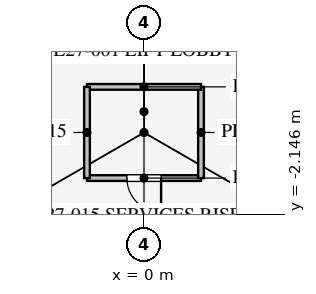
"""IFC4 building model, lengths in metres.
Left out: names, types, materials, properties, quantities, classifications, styles, units other than length and angle.
Written with IfcOpenShell. Run it as: python <this file> out.ifc"""

import sys

from ifc_helpers import new_model, si_unit, direction, frame, frame_2d, origin, place, context, subcontext, project, spatial, rectangle, extrude, element, fill, save


model = new_model("IFC4")
c1 = context("Model", 3, precision=1e-05, world=origin(), true_north=direction((0.0, 1.0)))
c2 = subcontext(c1, "Body", "Model", "MODEL_VIEW")
j1 = project(units=[si_unit("LENGTHUNIT", "METRE"), si_unit("PLANEANGLEUNIT", "RADIAN")], contexts=[c1])
p1 = place(None, origin())
s1 = spatial("IfcSite", under=j1, at=p1, CompositionType="ELEMENT")
p2 = place(p1, origin())
s2 = spatial("IfcBuilding", under=s1, at=p2, CompositionType="ELEMENT")
p3 = place(p2, frame((0.0, 0.0, 119.9)))
s3 = spatial("IfcBuildingStorey", under=s2, at=p3, CompositionType="ELEMENT", Elevation=119.9)
p4 = place(p3, frame((-1.5, -1.2, 0.0), z_axis=(0.0, 0.0, 1.0), x_axis=(1.0, 0.0, 0.0)))
e1 = element("IfcWall", 1, at=p4, inside=s3, PredefinedType="PARTITIONING", context=c2, shape_type="SweptSolid", body=[
    extrude(rectangle(XDim=3.0, YDim=0.15, at=frame_2d((1.5, 0.0))), origin(), (0.0, 0.0, 1.0), 4.0),
])
p5 = place(p4, frame((1.05, 0.0, 0.0)))
e2 = element("IfcOpeningElement", 2, at=p5, cuts=e1, PredefinedType="OPENING", context=c2, shape_type="SweptSolid", body=[
    extrude(rectangle(XDim=0.9, YDim=2.1, at=frame_2d((0.45, 1.05))), frame((0.0, 0.085, 0.0), z_axis=(0.0, -1.0, 0.0), x_axis=(1.0, 0.0, 0.0)), (0.0, 0.0, 1.0), 0.17),
])
p6 = place(p3, frame((1.5, -1.2, 0.0), z_axis=(0.0, 0.0, 1.0), x_axis=(0.0, 1.0, 0.0)))
e3 = element("IfcWall", 3, at=p6, inside=s3, PredefinedType="PARTITIONING", context=c2, shape_type="SweptSolid", body=[
    extrude(rectangle(XDim=2.4, YDim=0.15, at=frame_2d((1.2, 0.0))), origin(), (0.0, 0.0, 1.0), 4.0),
])
p7 = place(p3, frame((1.5, 1.2, 0.0), z_axis=(0.0, 0.0, 1.0), x_axis=(-1.0, 0.0, 0.0)))
e4 = element("IfcWall", 4, at=p7, inside=s3, PredefinedType="PARTITIONING", context=c2, shape_type="SweptSolid", body=[
    extrude(rectangle(XDim=3.0, YDim=0.15, at=frame_2d((1.5, 0.0))), origin(), (0.0, 0.0, 1.0), 4.0),
])
p8 = place(p3, frame((-1.5, 1.2, 0.0), z_axis=(0.0, 0.0, 1.0), x_axis=(0.0, -1.0, 0.0)))
e5 = element("IfcWall", 5, at=p8, inside=s3, PredefinedType="PARTITIONING", context=c2, shape_type="SweptSolid", body=[
    extrude(rectangle(XDim=2.4, YDim=0.15, at=frame_2d((1.2, 0.0))), origin(), (0.0, 0.0, 1.0), 4.0),
])
p9 = place(p3, frame((26.415, -15.231, 0.0), z_axis=(0.0, 0.0, 1.0), x_axis=(-0.50000091641, 0.866024874695, 0.0)))
e6 = element("IfcWall", 6, at=p9, inside=s3, PredefinedType="PARTITIONING", context=c2, shape_type="SweptSolid", body=[
    extrude(rectangle(XDim=52.796, YDim=0.12, at=frame_2d((26.398, 0.0))), origin(), (0.0, 0.0, 1.0), 2.9),
])
p10 = place(p9, frame((10.2, 0.0, 0.15)))
e7 = element("IfcOpeningElement", 7, at=p10, cuts=e6, PredefinedType="OPENING", context=c2, shape_type="SweptSolid", body=[
    extrude(rectangle(XDim=1.8, YDim=2.1, at=frame_2d((0.9, 1.05))), frame((0.0, 0.07, 0.0), z_axis=(0.0, -1.0, 0.0), x_axis=(1.0, 0.0, 0.0)), (0.0, 0.0, 1.0), 0.14),
])
p11 = place(p9, frame((40.8, 0.0, 0.15)))
e8 = element("IfcOpeningElement", 8, at=p11, cuts=e6, PredefinedType="OPENING", context=c2, shape_type="SweptSolid", body=[
    extrude(rectangle(XDim=1.8, YDim=2.1, at=frame_2d((0.9, 1.05))), frame((0.0, 0.07, 0.0), z_axis=(0.0, -1.0, 0.0), x_axis=(1.0, 0.0, 0.0)), (0.0, 0.0, 1.0), 0.14),
])
p12 = place(p3, frame((-0.016, 30.491, 0.0), z_axis=(0.0, 0.0, 1.0), x_axis=(-0.50000091641, -0.866024874695, 0.0)))
e9 = element("IfcWall", 9, at=p12, inside=s3, PredefinedType="PARTITIONING", context=c2, shape_type="SweptSolid", body=[
    extrude(rectangle(XDim=52.796, YDim=0.12, at=frame_2d((26.398, 0.0))), origin(), (0.0, 0.0, 1.0), 2.9),
])
p13 = place(p12, frame((10.2, 0.0, 0.15)))
e10 = element("IfcOpeningElement", 10, at=p13, cuts=e9, PredefinedType="OPENING", context=c2, shape_type="SweptSolid", body=[
    extrude(rectangle(XDim=1.8, YDim=2.1, at=frame_2d((0.9, 1.05))), frame((0.0, 0.07, 0.0), z_axis=(0.0, -1.0, 0.0), x_axis=(1.0, 0.0, 0.0)), (0.0, 0.0, 1.0), 0.14),
])
p14 = place(p12, frame((40.8, 0.0, 0.15)))
e11 = element("IfcOpeningElement", 11, at=p14, cuts=e9, PredefinedType="OPENING", context=c2, shape_type="SweptSolid", body=[
    extrude(rectangle(XDim=1.8, YDim=2.1, at=frame_2d((0.9, 1.05))), frame((0.0, 0.07, 0.0), z_axis=(0.0, -1.0, 0.0), x_axis=(1.0, 0.0, 0.0)), (0.0, 0.0, 1.0), 0.14),
])
p15 = place(p5, frame((0.9, 0.0, 0.0), z_axis=(0.0, 0.0, 1.0), x_axis=(-1.0, 0.0, 0.0)))
e12 = element("IfcDoor", 12, at=p15, inside=s3, OperationType="SINGLE_SWING_LEFT", PredefinedType="DOOR", context=c2, shape_type="SweptSolid", body=[
    extrude(rectangle(XDim=0.9, YDim=2.1, at=frame_2d((0.45, 1.05))), frame((0.0, 0.025, 0.0), z_axis=(0.0, -1.0, 0.0), x_axis=(1.0, 0.0, 0.0)), (0.0, 0.0, 1.0), 0.05),
])
fill(e2, e12)
save(model, sys.argv[1])
